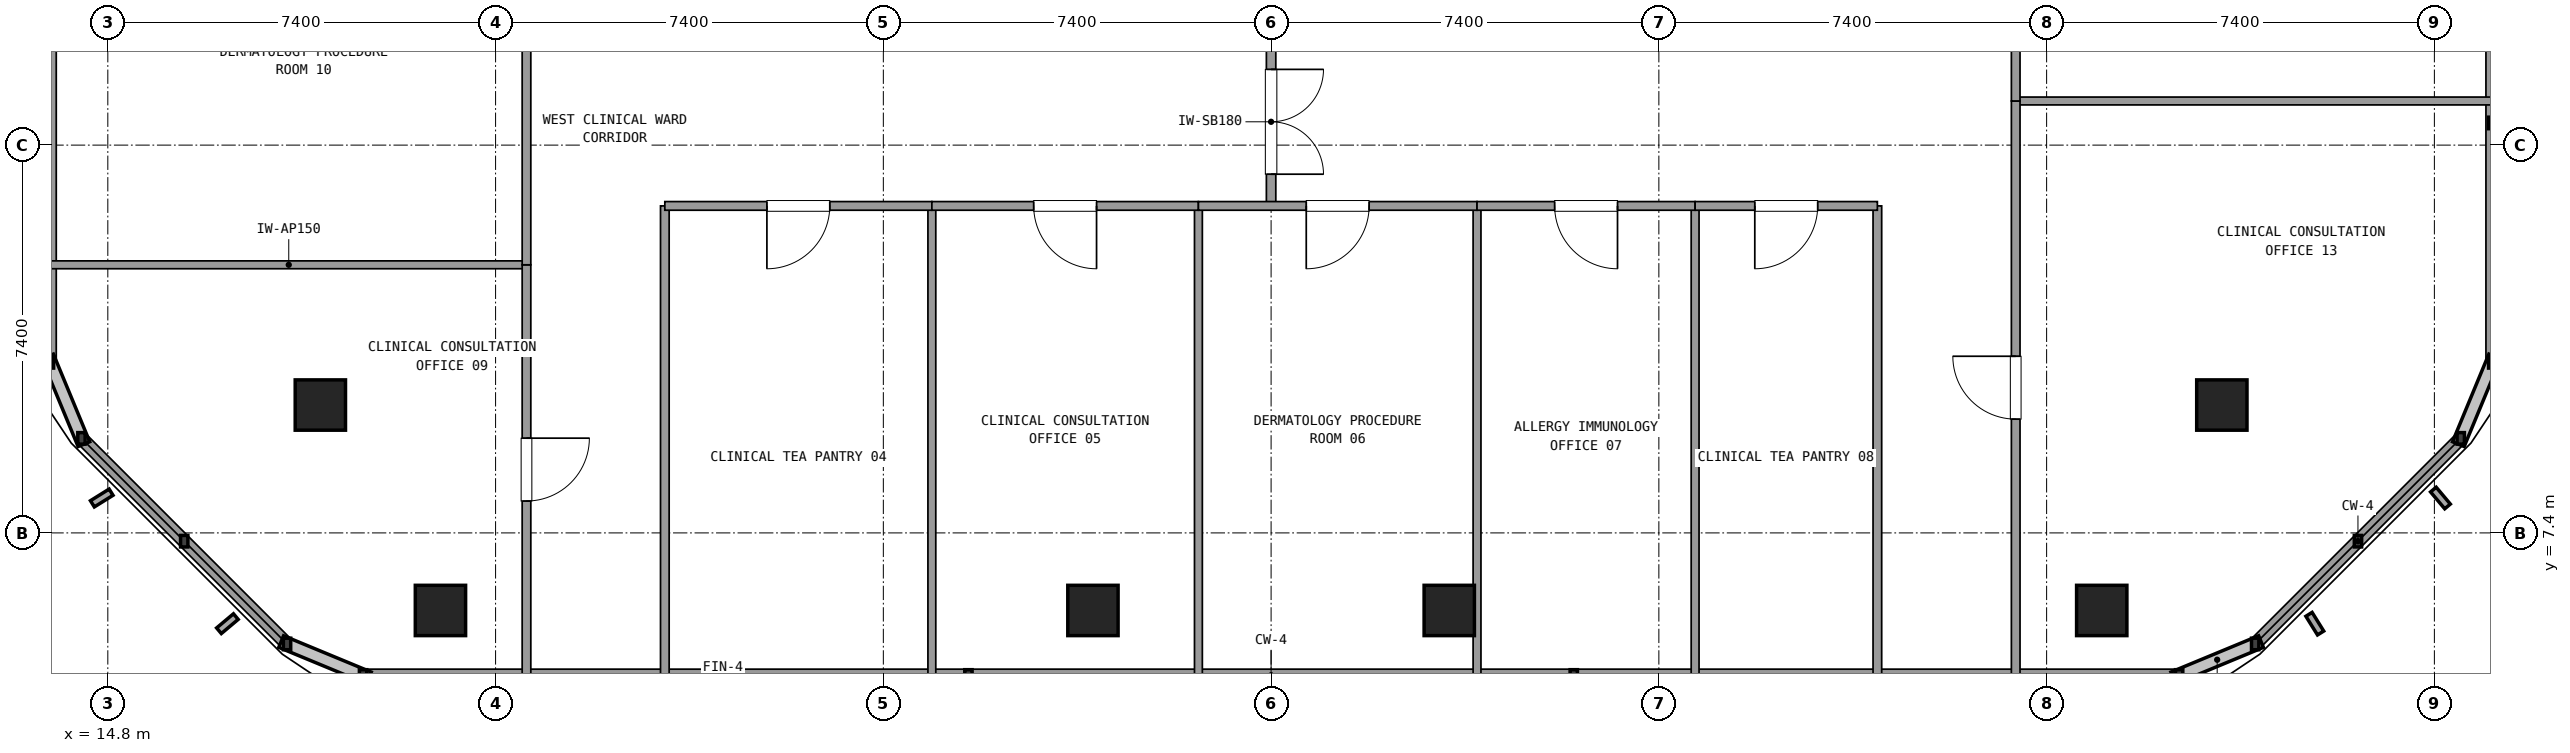
"""IFC4 building model, lengths in metres.
Left out: names, types, materials, properties, quantities, classifications, styles, units other than length and angle.
Written with IfcOpenShell. Run it as: python <this file> out.ifc"""

import sys

from ifc_helpers import new_model, si_unit, direction, frame, frame_2d, origin, origin_2d, place, context, subcontext, project, spatial, rectangle, extrude, element, fill, save


model = new_model("IFC4")
c1 = context("Model", 3, precision=1e-05, world=origin(), true_north=direction((0.0, 1.0)))
c2 = subcontext(c1, "Body", "Model", "MODEL_VIEW")
j1 = project(units=[si_unit("LENGTHUNIT", "METRE"), si_unit("PLANEANGLEUNIT", "RADIAN")], contexts=[c1])
p1 = place(None, origin())
s1 = spatial("IfcSite", under=j1, at=p1, CompositionType="ELEMENT")
p2 = place(p1, origin())
s2 = spatial("IfcBuilding", under=s1, at=p2, CompositionType="ELEMENT")
p3 = place(p2, frame((0.0, 0.0, 145.62)))
s3 = spatial("IfcBuildingStorey", under=s2, at=p3, CompositionType="ELEMENT", Elevation=145.62)
for number, where, z_axis, x_axis in (
    (1, (18.856, 9.84, 0.0), (0.0, 0.0, 1.0), (1.0, 0.0, 0.0)),
    (2, (21.148, 5.92, 0.0), (0.0, 0.0, 1.0), (1.0, 0.0, 0.0)),
    (3, (33.6, 5.92, 0.0), (0.0, 0.0, 1.0), (1.0, 0.0, 0.0)),
    (4, (40.4, 5.92, 0.0), (0.0, 0.0, 1.0), (1.0, 0.0, 0.0)),
    (5, (52.852, 5.92, 0.0), (0.0, 0.0, 1.0), (1.0, 0.0, 0.0)),
    (6, (55.144, 9.84, 0.0), (0.0, 0.0, 1.0), (1.0, 0.0, 0.0)),
):
    element("IfcColumn", number, at=place(p3, frame(where, z_axis=z_axis, x_axis=x_axis)), inside=s3, PredefinedType="COLUMN", context=c2, shape_type="SweptSolid", body=[
        extrude(rectangle(XDim=0.96, YDim=0.96, at=origin_2d()), origin(), (0.0, 0.0, 1.0), 3.6),
    ])
p4 = place(p3, frame((19.671, 4.68, 0.0), z_axis=(0.0, 0.0, 1.0), x_axis=(1.0, 0.0, 0.0)))
e7 = element("IfcWall", 7, at=p4, inside=s3, PredefinedType="SOLIDWALL", context=c2, shape_type="SweptSolid", body=[
    extrude(rectangle(XDim=34.658, YDim=0.24, at=frame_2d((17.329, 0.0))), origin(), (0.0, 0.0, 1.0), 0.85),
])
p5 = place(p3, frame((55.78, 5.281, 0.0), z_axis=(0.0, 0.0, 1.0), x_axis=(0.707084777957, 0.707128783731, 0.0)))
e8 = element("IfcWall", 8, at=p5, inside=s3, PredefinedType="SOLIDWALL", context=c2, shape_type="SweptSolid", body=[
    extrude(rectangle(XDim=5.548, YDim=0.24, at=frame_2d((2.774, 0.0))), origin(), (0.0, 0.0, 1.0), 0.85),
])
p6 = place(p3, frame((60.304, 10.655, 0.0), z_axis=(0.0, 0.0, 1.0), x_axis=(0.0, 1.0, 0.0)))
e9 = element("IfcWall", 9, at=p6, inside=s3, PredefinedType="SOLIDWALL", context=c2, shape_type="SweptSolid", body=[
    extrude(rectangle(XDim=13.705, YDim=0.24, at=frame_2d((6.853, 0.0))), origin(), (0.0, 0.0, 1.0), 0.85),
])
p7 = place(p3, frame((13.696, 41.145, 0.0), z_axis=(0.0, 0.0, 1.0), x_axis=(0.0, -1.0, 0.0)))
e10 = element("IfcWall", 10, at=p7, inside=s3, PredefinedType="SOLIDWALL", context=c2, shape_type="SweptSolid", body=[
    extrude(rectangle(XDim=30.49, YDim=0.24, at=frame_2d((15.245, 0.0))), origin(), (0.0, 0.0, 1.0), 0.85),
])
p8 = place(p3, frame((14.297, 9.204, 0.0), z_axis=(0.0, 0.0, 1.0), x_axis=(0.707084777957, -0.707128783731, 0.0)))
e11 = element("IfcWall", 11, at=p8, inside=s3, PredefinedType="SOLIDWALL", context=c2, shape_type="SweptSolid", body=[
    extrude(rectangle(XDim=5.548, YDim=0.24, at=frame_2d((2.774, 0.0))), origin(), (0.0, 0.0, 1.0), 0.85),
])
p9 = place(p3, frame((37.0, 13.64, 0.0), z_axis=(0.0, 0.0, 1.0), x_axis=(0.0, 1.0, 0.0)))
e12 = element("IfcWall", 12, at=p9, inside=s3, PredefinedType="PARTITIONING", context=c2, shape_type="SweptSolid", body=[
    extrude(rectangle(XDim=3.21, YDim=0.18, at=frame_2d((1.605, 0.0))), origin(), (0.0, 0.0, 1.0), 2.61),
])
p10 = place(p9, frame((0.605, 0.0, 0.0)))
e13 = element("IfcOpeningElement", 13, at=p10, cuts=e12, PredefinedType="OPENING", context=c2, shape_type="SweptSolid", body=[
    extrude(rectangle(XDim=2.0, YDim=2.2, at=frame_2d((1.0, 1.1))), frame((0.0, 0.1, 0.0), z_axis=(0.0, -1.0, 0.0), x_axis=(1.0, 0.0, 0.0)), (0.0, 0.0, 1.0), 0.2),
])
for number, where, z_axis, x_axis in (
    (14, (25.43, 4.7, 0.0), (0.0, 0.0, 1.0), (0.0, 1.0, 0.0)),
    (15, (48.57, 4.7, 0.0), (0.0, 0.0, 1.0), (0.0, 1.0, 0.0)),
):
    element("IfcWall", number, at=place(p3, frame(where, z_axis=z_axis, x_axis=x_axis)), inside=s3, PredefinedType="PARTITIONING", context=c2, shape_type="SweptSolid", body=[
        extrude(rectangle(XDim=8.94, YDim=0.165, at=frame_2d((4.47, 0.0))), origin(), (0.0, 0.0, 1.0), 2.61),
    ])
p11 = place(p3, frame((30.526, 13.64, 0.0), z_axis=(0.0, 0.0, 1.0), x_axis=(0.0, -1.0, 0.0)))
e16 = element("IfcWall", 16, at=p11, inside=s3, PredefinedType="PARTITIONING", context=c2, shape_type="SweptSolid", body=[
    extrude(rectangle(XDim=8.94, YDim=0.15, at=frame_2d((4.47, 0.0))), origin(), (0.0, 0.0, 1.0), 2.61),
])
p12 = place(p3, frame((25.43, 13.64, 0.0), z_axis=(0.0, 0.0, 1.0), x_axis=(1.0, 0.0, 0.0)))
e17 = element("IfcWall", 17, at=p12, inside=s3, PredefinedType="PARTITIONING", context=c2, shape_type="SweptSolid", body=[
    extrude(rectangle(XDim=5.096, YDim=0.165, at=frame_2d((2.548, 0.0))), origin(), (0.0, 0.0, 1.0), 2.61),
])
p13 = place(p12, frame((1.948, 0.0, 0.0)))
e18 = element("IfcOpeningElement", 18, at=p13, cuts=e17, PredefinedType="OPENING", context=c2, shape_type="SweptSolid", body=[
    extrude(rectangle(XDim=1.2, YDim=2.15, at=frame_2d((0.6, 1.075))), frame((0.0, 0.093, 0.0), z_axis=(0.0, -1.0, 0.0), x_axis=(1.0, 0.0, 0.0)), (0.0, 0.0, 1.0), 0.185),
])
p14 = place(p3, frame((35.613, 13.64, 0.0), z_axis=(0.0, 0.0, 1.0), x_axis=(0.0, -1.0, 0.0)))
e19 = element("IfcWall", 19, at=p14, inside=s3, PredefinedType="PARTITIONING", context=c2, shape_type="SweptSolid", body=[
    extrude(rectangle(XDim=8.94, YDim=0.15, at=frame_2d((4.47, 0.0))), origin(), (0.0, 0.0, 1.0), 2.61),
])
p15 = place(p3, frame((30.526, 13.64, 0.0), z_axis=(0.0, 0.0, 1.0), x_axis=(1.0, 0.0, 0.0)))
e20 = element("IfcWall", 20, at=p15, inside=s3, PredefinedType="PARTITIONING", context=c2, shape_type="SweptSolid", body=[
    extrude(rectangle(XDim=5.087, YDim=0.165, at=frame_2d((2.543, 0.0))), origin(), (0.0, 0.0, 1.0), 2.61),
])
p16 = place(p15, frame((1.943, 0.0, 0.0)))
e21 = element("IfcOpeningElement", 21, at=p16, cuts=e20, PredefinedType="OPENING", context=c2, shape_type="SweptSolid", body=[
    extrude(rectangle(XDim=1.2, YDim=2.15, at=frame_2d((0.6, 1.075))), frame((0.0, 0.093, 0.0), z_axis=(0.0, -1.0, 0.0), x_axis=(1.0, 0.0, 0.0)), (0.0, 0.0, 1.0), 0.185),
])
p17 = place(p3, frame((40.93, 13.64, 0.0), z_axis=(0.0, 0.0, 1.0), x_axis=(0.0, -1.0, 0.0)))
e22 = element("IfcWall", 22, at=p17, inside=s3, PredefinedType="PARTITIONING", context=c2, shape_type="SweptSolid", body=[
    extrude(rectangle(XDim=8.94, YDim=0.15, at=frame_2d((4.47, 0.0))), origin(), (0.0, 0.0, 1.0), 2.61),
])
p18 = place(p3, frame((35.613, 13.64, 0.0), z_axis=(0.0, 0.0, 1.0), x_axis=(1.0, 0.0, 0.0)))
e23 = element("IfcWall", 23, at=p18, inside=s3, PredefinedType="PARTITIONING", context=c2, shape_type="SweptSolid", body=[
    extrude(rectangle(XDim=5.317, YDim=0.165, at=frame_2d((2.658, 0.0))), origin(), (0.0, 0.0, 1.0), 2.61),
])
p19 = place(p18, frame((2.058, 0.0, 0.0)))
e24 = element("IfcOpeningElement", 24, at=p19, cuts=e23, PredefinedType="OPENING", context=c2, shape_type="SweptSolid", body=[
    extrude(rectangle(XDim=1.2, YDim=2.15, at=frame_2d((0.6, 1.075))), frame((0.0, 0.093, 0.0), z_axis=(0.0, -1.0, 0.0), x_axis=(1.0, 0.0, 0.0)), (0.0, 0.0, 1.0), 0.185),
])
p20 = place(p3, frame((45.092, 13.64, 0.0), z_axis=(0.0, 0.0, 1.0), x_axis=(0.0, -1.0, 0.0)))
e25 = element("IfcWall", 25, at=p20, inside=s3, PredefinedType="PARTITIONING", context=c2, shape_type="SweptSolid", body=[
    extrude(rectangle(XDim=8.94, YDim=0.15, at=frame_2d((4.47, 0.0))), origin(), (0.0, 0.0, 1.0), 2.61),
])
p21 = place(p3, frame((40.93, 13.64, 0.0), z_axis=(0.0, 0.0, 1.0), x_axis=(1.0, 0.0, 0.0)))
e26 = element("IfcWall", 26, at=p21, inside=s3, PredefinedType="PARTITIONING", context=c2, shape_type="SweptSolid", body=[
    extrude(rectangle(XDim=4.162, YDim=0.165, at=frame_2d((2.081, 0.0))), origin(), (0.0, 0.0, 1.0), 2.61),
])
p22 = place(p21, frame((1.481, 0.0, 0.0)))
e27 = element("IfcOpeningElement", 27, at=p22, cuts=e26, PredefinedType="OPENING", context=c2, shape_type="SweptSolid", body=[
    extrude(rectangle(XDim=1.2, YDim=2.15, at=frame_2d((0.6, 1.075))), frame((0.0, 0.093, 0.0), z_axis=(0.0, -1.0, 0.0), x_axis=(1.0, 0.0, 0.0)), (0.0, 0.0, 1.0), 0.185),
])
p23 = place(p3, frame((45.092, 13.64, 0.0), z_axis=(0.0, 0.0, 1.0), x_axis=(1.0, 0.0, 0.0)))
e28 = element("IfcWall", 28, at=p23, inside=s3, PredefinedType="PARTITIONING", context=c2, shape_type="SweptSolid", body=[
    extrude(rectangle(XDim=3.478, YDim=0.165, at=frame_2d((1.739, 0.0))), origin(), (0.0, 0.0, 1.0), 2.61),
])
p24 = place(p23, frame((1.139, 0.0, 0.0)))
e29 = element("IfcOpeningElement", 29, at=p24, cuts=e28, PredefinedType="OPENING", context=c2, shape_type="SweptSolid", body=[
    extrude(rectangle(XDim=1.2, YDim=2.15, at=frame_2d((0.6, 1.075))), frame((0.0, 0.093, 0.0), z_axis=(0.0, -1.0, 0.0), x_axis=(1.0, 0.0, 0.0)), (0.0, 0.0, 1.0), 0.185),
])
p25 = place(p3, frame((22.79, 12.516, 0.0), z_axis=(0.0, 0.0, 1.0), x_axis=(-1.0, 0.0, 0.0)))
e30 = element("IfcWall", 30, at=p25, inside=s3, PredefinedType="PARTITIONING", context=c2, shape_type="SweptSolid", body=[
    extrude(rectangle(XDim=9.074, YDim=0.15, at=frame_2d((4.537, 0.0))), origin(), (0.0, 0.0, 1.0), 2.61),
])
p26 = place(p3, frame((22.79, 4.7, 0.0), z_axis=(0.0, 0.0, 1.0), x_axis=(0.0, 1.0, 0.0)))
e31 = element("IfcWall", 31, at=p26, inside=s3, PredefinedType="PARTITIONING", context=c2, shape_type="SweptSolid", body=[
    extrude(rectangle(XDim=7.816, YDim=0.165, at=frame_2d((3.908, 0.0))), origin(), (0.0, 0.0, 1.0), 2.61),
])
p27 = place(p26, frame((3.308, 0.0, 0.0)))
e32 = element("IfcOpeningElement", 32, at=p27, cuts=e31, PredefinedType="OPENING", context=c2, shape_type="SweptSolid", body=[
    extrude(rectangle(XDim=1.2, YDim=2.15, at=frame_2d((0.6, 1.075))), frame((0.0, 0.093, 0.0), z_axis=(0.0, -1.0, 0.0), x_axis=(1.0, 0.0, 0.0)), (0.0, 0.0, 1.0), 0.185),
])
p28 = place(p3, frame((22.79, 12.516, 0.0), z_axis=(0.0, 0.0, 1.0), x_axis=(0.0, 1.0, 0.0)))
e33 = element("IfcWall", 33, at=p28, inside=s3, PredefinedType="PARTITIONING", context=c2, shape_type="SweptSolid", body=[
    extrude(rectangle(XDim=11.724, YDim=0.165, at=frame_2d((5.862, 0.0))), origin(), (0.0, 0.0, 1.0), 2.61),
])
p29 = place(p28, frame((5.262, 0.0, 0.0)))
e34 = element("IfcOpeningElement", 34, at=p29, cuts=e33, PredefinedType="OPENING", context=c2, shape_type="SweptSolid", body=[
    extrude(rectangle(XDim=1.2, YDim=2.15, at=frame_2d((0.6, 1.075))), frame((0.0, 0.093, 0.0), z_axis=(0.0, -1.0, 0.0), x_axis=(1.0, 0.0, 0.0)), (0.0, 0.0, 1.0), 0.185),
])
p30 = place(p3, frame((51.21, 15.642, 0.0), z_axis=(0.0, 0.0, 1.0), x_axis=(1.0, 0.0, 0.0)))
e35 = element("IfcWall", 35, at=p30, inside=s3, PredefinedType="PARTITIONING", context=c2, shape_type="SweptSolid", body=[
    extrude(rectangle(XDim=9.074, YDim=0.15, at=frame_2d((4.537, 0.0))), origin(), (0.0, 0.0, 1.0), 2.61),
])
p31 = place(p3, frame((51.21, 4.7, 0.0), z_axis=(0.0, 0.0, 1.0), x_axis=(0.0, 1.0, 0.0)))
e36 = element("IfcWall", 36, at=p31, inside=s3, PredefinedType="PARTITIONING", context=c2, shape_type="SweptSolid", body=[
    extrude(rectangle(XDim=10.942, YDim=0.165, at=frame_2d((5.471, 0.0))), origin(), (0.0, 0.0, 1.0), 2.61),
])
p32 = place(p31, frame((4.871, 0.0, 0.0)))
e37 = element("IfcOpeningElement", 37, at=p32, cuts=e36, PredefinedType="OPENING", context=c2, shape_type="SweptSolid", body=[
    extrude(rectangle(XDim=1.2, YDim=2.15, at=frame_2d((0.6, 1.075))), frame((0.0, 0.093, 0.0), z_axis=(0.0, -1.0, 0.0), x_axis=(1.0, 0.0, 0.0)), (0.0, 0.0, 1.0), 0.185),
])
p33 = place(p3, frame((51.21, 15.642, 0.0), z_axis=(0.0, 0.0, 1.0), x_axis=(0.0, 1.0, 0.0)))
e38 = element("IfcWall", 38, at=p33, inside=s3, PredefinedType="PARTITIONING", context=c2, shape_type="SweptSolid", body=[
    extrude(rectangle(XDim=8.598, YDim=0.165, at=frame_2d((4.299, 0.0))), origin(), (0.0, 0.0, 1.0), 2.61),
])
p34 = place(p33, frame((3.699, 0.0, 0.0)))
e39 = element("IfcOpeningElement", 39, at=p34, cuts=e38, PredefinedType="OPENING", context=c2, shape_type="SweptSolid", body=[
    extrude(rectangle(XDim=1.2, YDim=2.15, at=frame_2d((0.6, 1.075))), frame((0.0, 0.093, 0.0), z_axis=(0.0, -1.0, 0.0), x_axis=(1.0, 0.0, 0.0)), (0.0, 0.0, 1.0), 0.185),
])
p35 = place(p10, frame((2.0, 0.0, 0.0), z_axis=(0.0, 0.0, 1.0), x_axis=(-1.0, 0.0, 0.0)))
e40 = element("IfcDoor", 40, at=p35, inside=s3, OperationType="DOUBLE_DOOR_SINGLE_SWING", PredefinedType="DOOR", context=c2, shape_type="SweptSolid", body=[
    extrude(rectangle(XDim=2.0, YDim=2.2, at=frame_2d((1.0, 1.1))), frame((0.0, 0.025, 0.0), z_axis=(0.0, -1.0, 0.0), x_axis=(1.0, 0.0, 0.0)), (0.0, 0.0, 1.0), 0.05),
])
fill(e13, e40)
p36 = place(p13, frame((1.2, 0.0, 0.0), z_axis=(0.0, 0.0, 1.0), x_axis=(-1.0, 0.0, 0.0)))
e41 = element("IfcDoor", 41, at=p36, inside=s3, OperationType="SINGLE_SWING_LEFT", PredefinedType="DOOR", context=c2, shape_type="SweptSolid", body=[
    extrude(rectangle(XDim=1.2, YDim=2.15, at=frame_2d((0.6, 1.075))), frame((0.0, 0.025, 0.0), z_axis=(0.0, -1.0, 0.0), x_axis=(1.0, 0.0, 0.0)), (0.0, 0.0, 1.0), 0.05),
])
fill(e18, e41)
p37 = place(p16, frame((1.2, 0.0, 0.0), z_axis=(0.0, 0.0, 1.0), x_axis=(-1.0, 0.0, 0.0)))
e42 = element("IfcDoor", 42, at=p37, inside=s3, OperationType="SINGLE_SWING_RIGHT", PredefinedType="DOOR", context=c2, shape_type="SweptSolid", body=[
    extrude(rectangle(XDim=1.2, YDim=2.15, at=frame_2d((0.6, 1.075))), frame((0.0, 0.025, 0.0), z_axis=(0.0, -1.0, 0.0), x_axis=(1.0, 0.0, 0.0)), (0.0, 0.0, 1.0), 0.05),
])
fill(e21, e42)
p38 = place(p19, frame((1.2, 0.0, 0.0), z_axis=(0.0, 0.0, 1.0), x_axis=(-1.0, 0.0, 0.0)))
e43 = element("IfcDoor", 43, at=p38, inside=s3, OperationType="SINGLE_SWING_LEFT", PredefinedType="DOOR", context=c2, shape_type="SweptSolid", body=[
    extrude(rectangle(XDim=1.2, YDim=2.15, at=frame_2d((0.6, 1.075))), frame((0.0, 0.025, 0.0), z_axis=(0.0, -1.0, 0.0), x_axis=(1.0, 0.0, 0.0)), (0.0, 0.0, 1.0), 0.05),
])
fill(e24, e43)
p39 = place(p22, frame((1.2, 0.0, 0.0), z_axis=(0.0, 0.0, 1.0), x_axis=(-1.0, 0.0, 0.0)))
e44 = element("IfcDoor", 44, at=p39, inside=s3, OperationType="SINGLE_SWING_RIGHT", PredefinedType="DOOR", context=c2, shape_type="SweptSolid", body=[
    extrude(rectangle(XDim=1.2, YDim=2.15, at=frame_2d((0.6, 1.075))), frame((0.0, 0.025, 0.0), z_axis=(0.0, -1.0, 0.0), x_axis=(1.0, 0.0, 0.0)), (0.0, 0.0, 1.0), 0.05),
])
fill(e27, e44)
p40 = place(p24, frame((1.2, 0.0, 0.0), z_axis=(0.0, 0.0, 1.0), x_axis=(-1.0, 0.0, 0.0)))
e45 = element("IfcDoor", 45, at=p40, inside=s3, OperationType="SINGLE_SWING_LEFT", PredefinedType="DOOR", context=c2, shape_type="SweptSolid", body=[
    extrude(rectangle(XDim=1.2, YDim=2.15, at=frame_2d((0.6, 1.075))), frame((0.0, 0.025, 0.0), z_axis=(0.0, -1.0, 0.0), x_axis=(1.0, 0.0, 0.0)), (0.0, 0.0, 1.0), 0.05),
])
fill(e29, e45)
p41 = place(p27, frame((1.2, 0.0, 0.0), z_axis=(0.0, 0.0, 1.0), x_axis=(-1.0, 0.0, 0.0)))
e46 = element("IfcDoor", 46, at=p41, inside=s3, OperationType="SINGLE_SWING_RIGHT", PredefinedType="DOOR", context=c2, shape_type="SweptSolid", body=[
    extrude(rectangle(XDim=1.2, YDim=2.15, at=frame_2d((0.6, 1.075))), frame((0.0, 0.025, 0.0), z_axis=(0.0, -1.0, 0.0), x_axis=(1.0, 0.0, 0.0)), (0.0, 0.0, 1.0), 0.05),
])
fill(e32, e46)
p42 = place(p32, origin())
e47 = element("IfcDoor", 47, at=p42, inside=s3, OperationType="SINGLE_SWING_RIGHT", PredefinedType="DOOR", context=c2, shape_type="SweptSolid", body=[
    extrude(rectangle(XDim=1.2, YDim=2.15, at=frame_2d((0.6, 1.075))), frame((0.0, 0.025, 0.0), z_axis=(0.0, -1.0, 0.0), x_axis=(1.0, 0.0, 0.0)), (0.0, 0.0, 1.0), 0.05),
])
fill(e37, e47)
save(model, sys.argv[1])
